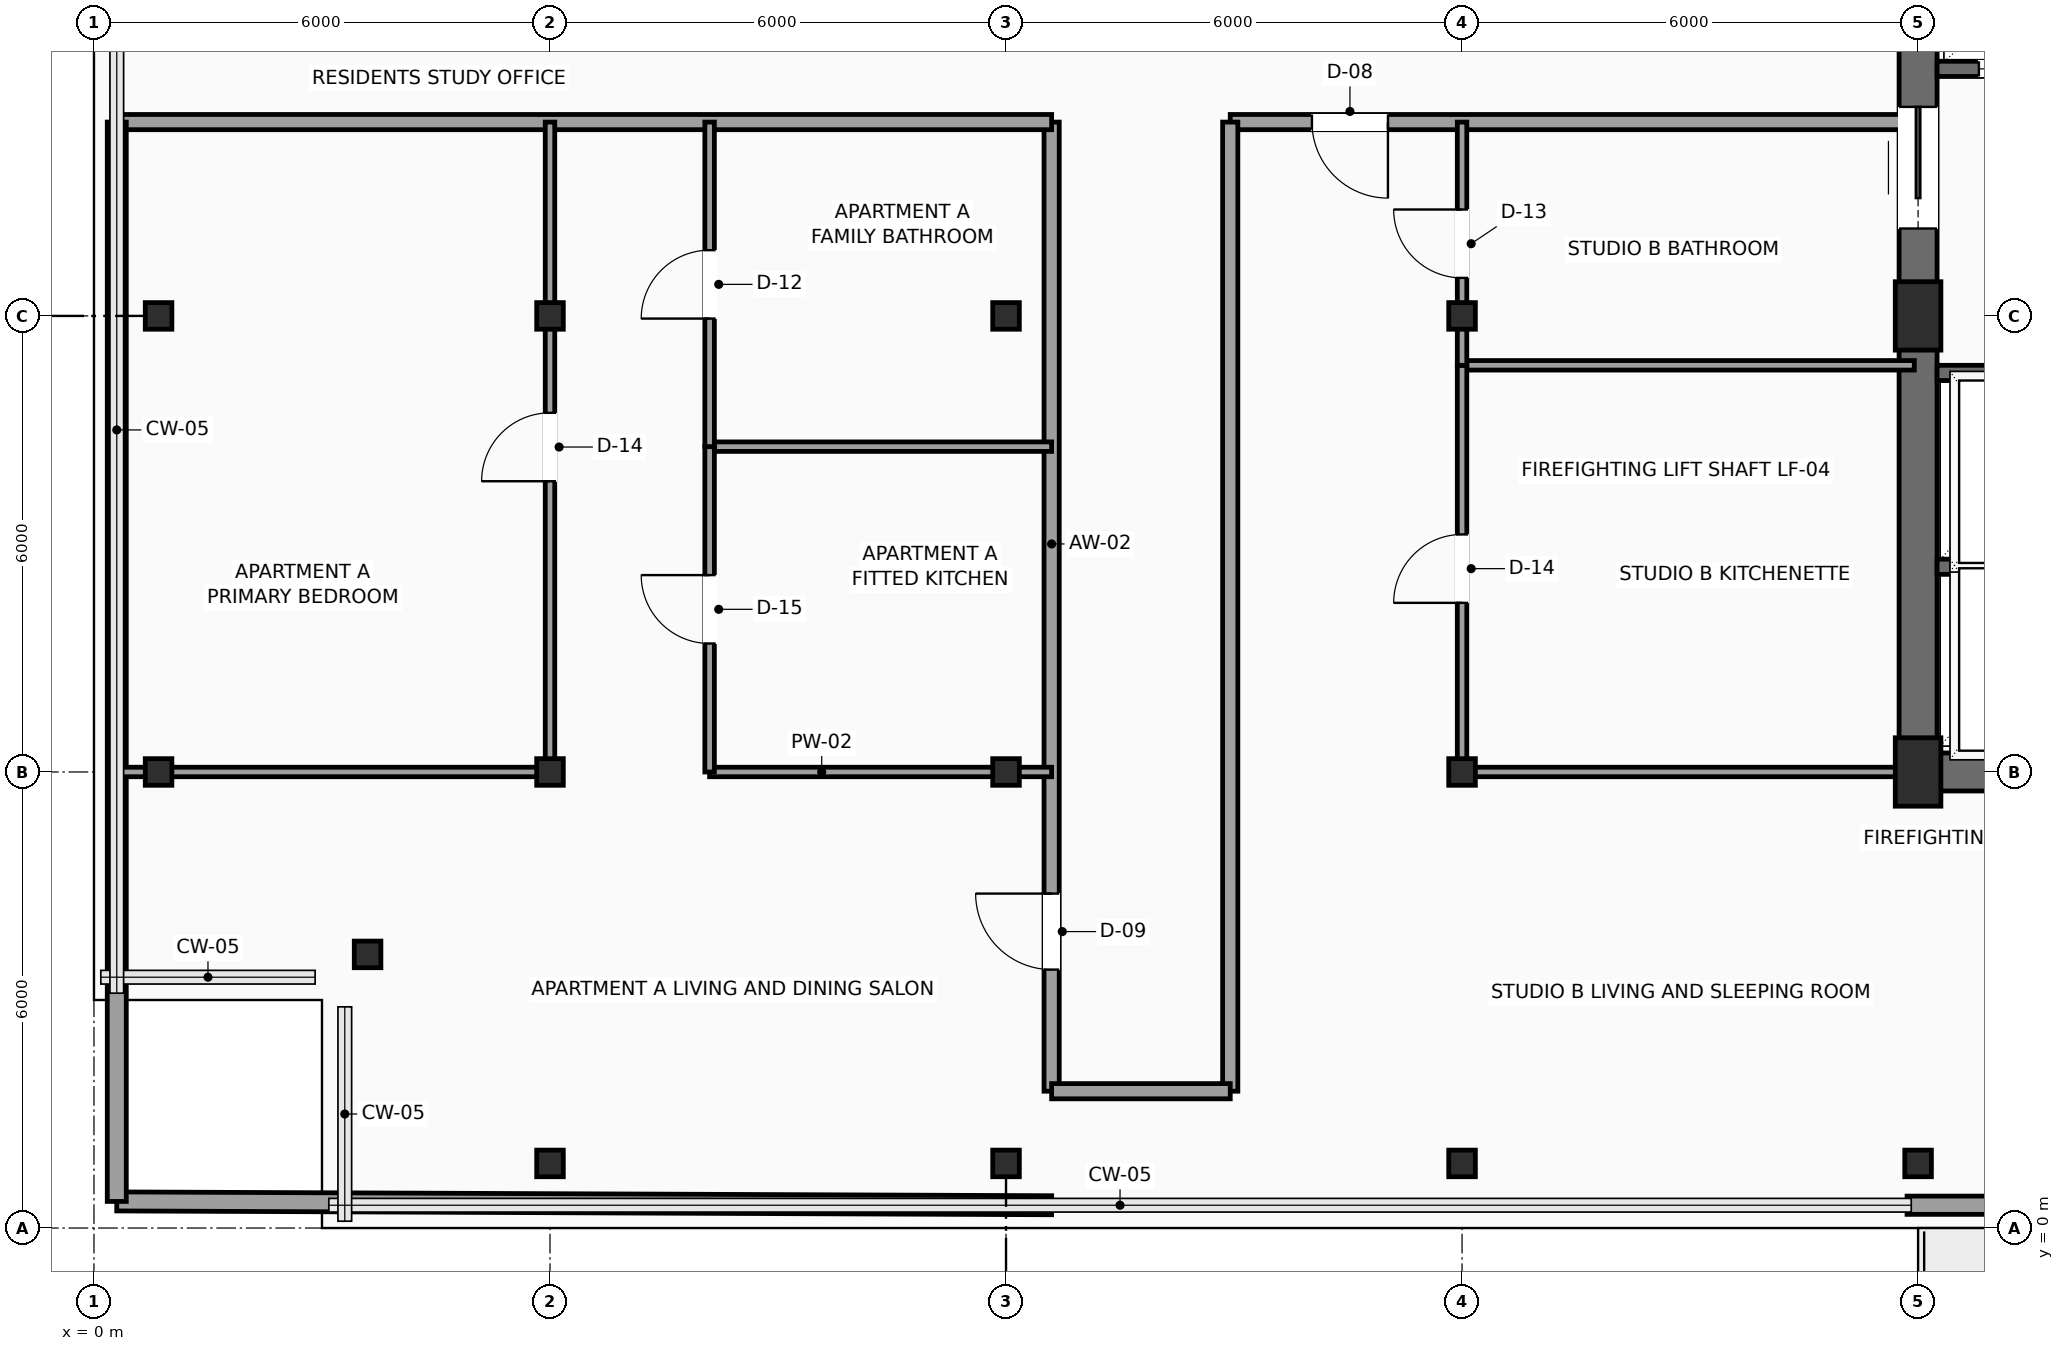
"""IFC4 building model, lengths in metres.
Left out: names, types, materials, properties, quantities, classifications, styles, units other than length and angle.
Written with IfcOpenShell. Run it as: python <this file> out.ifc"""

import sys

from ifc_helpers import new_model, si_unit, direction, frame, frame_2d, origin, origin_2d, place, context, subcontext, project, spatial, rectangle, hollow_rectangle, extrude, element, fill, save


model = new_model("IFC4")
c1 = context("Model", 3, precision=1e-05, world=origin(), true_north=direction((0.0, 1.0)))
c2 = subcontext(c1, "Body", "Model", "MODEL_VIEW")
j1 = project(units=[si_unit("LENGTHUNIT", "METRE"), si_unit("PLANEANGLEUNIT", "RADIAN")], contexts=[c1])
p1 = place(None, origin())
s1 = spatial("IfcSite", under=j1, at=p1, CompositionType="ELEMENT")
p2 = place(p1, origin())
s2 = spatial("IfcBuilding", under=s1, at=p2, CompositionType="ELEMENT")
p3 = place(p2, frame((0.0, 0.0, 246.7)))
s3 = spatial("IfcBuildingStorey", under=s2, at=p3, CompositionType="ELEMENT", Elevation=246.7)
for number, where, z_axis, x_axis in (
    (1, (24.0, 6.0, 0.0), (0.0, 0.0, 1.0), (1.0, 0.0, 0.0)),
    (2, (24.0, 12.0, 0.0), (0.0, 0.0, 1.0), (1.0, 0.0, 0.0)),
):
    element("IfcColumn", number, at=place(p3, frame(where, z_axis=z_axis, x_axis=x_axis)), inside=s3, PredefinedType="COLUMN", context=c2, shape_type="SweptSolid", body=[
        extrude(rectangle(XDim=0.6, YDim=0.9, at=origin_2d()), origin(), (0.0, 0.0, 1.0), 3.5),
    ])
for number, where, z_axis, x_axis in (
    (3, (3.6, 3.6, 0.0), (0.0, 0.0, 1.0), (1.0, 0.0, 0.0)),
    (4, (0.85, 6.0, 0.0), (0.0, 0.0, 1.0), (1.0, 0.0, 0.0)),
    (5, (0.85, 12.0, 0.0), (0.0, 0.0, 1.0), (1.0, 0.0, 0.0)),
    (6, (6.0, 0.85, 0.0), (0.0, 0.0, 1.0), (1.0, 0.0, 0.0)),
    (7, (6.0, 6.0, 0.0), (0.0, 0.0, 1.0), (1.0, 0.0, 0.0)),
    (8, (6.0, 12.0, 0.0), (0.0, 0.0, 1.0), (1.0, 0.0, 0.0)),
    (9, (12.0, 0.85, 0.0), (0.0, 0.0, 1.0), (1.0, 0.0, 0.0)),
    (10, (12.0, 6.0, 0.0), (0.0, 0.0, 1.0), (1.0, 0.0, 0.0)),
    (11, (12.0, 12.0, 0.0), (0.0, 0.0, 1.0), (1.0, 0.0, 0.0)),
    (12, (18.0, 0.85, 0.0), (0.0, 0.0, 1.0), (1.0, 0.0, 0.0)),
    (13, (18.0, 6.0, 0.0), (0.0, 0.0, 1.0), (1.0, 0.0, 0.0)),
    (14, (18.0, 12.0, 0.0), (0.0, 0.0, 1.0), (1.0, 0.0, 0.0)),
    (15, (24.0, 0.85, 0.0), (0.0, 0.0, 1.0), (1.0, 0.0, 0.0)),
):
    element("IfcColumn", number, at=place(p3, frame(where, z_axis=z_axis, x_axis=x_axis)), inside=s3, PredefinedType="COLUMN", context=c2, shape_type="SweptSolid", body=[
        extrude(hollow_rectangle(XDim=0.35, YDim=0.35, WallThickness=0.016, InnerFilletRadius=0.016, OuterFilletRadius=0.032, at=origin_2d()), origin(), (0.0, 0.0, 1.0), 3.5),
    ])
p4 = place(p3, frame((33.145, 0.3, 0.0), z_axis=(0.0, 0.0, 1.0), x_axis=(-1.0, 0.0, 0.0)))
e16 = element("IfcWall", 16, at=p4, inside=s3, PredefinedType="SOLIDWALL", context=c2, shape_type="SweptSolid", body=[
    extrude(rectangle(XDim=9.29, YDim=0.24, at=frame_2d((4.645, 0.0))), origin(), (0.0, 0.0, 1.0), 3.3),
])
p5 = place(p4, frame((3.945, 0.0, 0.0)))
e17 = element("IfcOpeningElement", 17, at=p5, cuts=e16, PredefinedType="OPENING", context=c2, shape_type="SweptSolid", body=[
    extrude(rectangle(XDim=1.05, YDim=2.2, at=frame_2d((0.525, 1.1))), frame((0.0, 0.13, 0.0), z_axis=(0.0, -1.0, 0.0), x_axis=(1.0, 0.0, 0.0)), (0.0, 0.0, 1.0), 0.26),
])
p6 = place(p4, frame((5.345, 0.0, 0.6)))
e18 = element("IfcOpeningElement", 18, at=p6, cuts=e16, PredefinedType="OPENING", context=c2, shape_type="SweptSolid", body=[
    extrude(rectangle(XDim=2.7, YDim=2.3, at=frame_2d((1.35, 1.15))), frame((0.0, 0.13, 0.0), z_axis=(0.0, -1.0, 0.0), x_axis=(1.0, 0.0, 0.0)), (0.0, 0.0, 1.0), 0.26),
])
p7 = place(p4, frame((1.4, 0.0, 0.6)))
e19 = element("IfcOpeningElement", 19, at=p7, cuts=e16, PredefinedType="OPENING", context=c2, shape_type="SweptSolid", body=[
    extrude(rectangle(XDim=0.9, YDim=2.2, at=frame_2d((0.45, 1.1))), frame((0.0, 0.13, 0.0), z_axis=(0.0, -1.0, 0.0), x_axis=(1.0, 0.0, 0.0)), (0.0, 0.0, 1.0), 0.26),
])
p8 = place(p3, frame((24.0, 6.0, 0.0), z_axis=(0.0, 0.0, 1.0), x_axis=(1.0, 0.0, 0.0)))
e20 = element("IfcWall", 20, at=p8, inside=s3, PredefinedType="SHEAR", context=c2, shape_type="SweptSolid", body=[
    extrude(rectangle(XDim=9.6, YDim=0.5, at=frame_2d((4.8, 0.0))), origin(), (0.0, 0.0, 1.0), 3.3),
])
p9 = place(p3, frame((24.0, 6.0, 0.0), z_axis=(0.0, 0.0, 1.0), x_axis=(0.0, 1.0, 0.0)))
e21 = element("IfcWall", 21, at=p9, inside=s3, PredefinedType="SHEAR", context=c2, shape_type="SweptSolid", body=[
    extrude(rectangle(XDim=12.0, YDim=0.5, at=frame_2d((6.0, 0.0))), origin(), (0.0, 0.0, 1.0), 3.3),
])
p10 = place(p9, frame((7.15, 0.0, 0.0)))
e22 = element("IfcOpeningElement", 22, at=p10, cuts=e21, PredefinedType="OPENING", context=c2, shape_type="SweptSolid", body=[
    extrude(rectangle(XDim=1.6, YDim=2.3, at=frame_2d((0.8, 1.15))), frame((0.0, 0.26, 0.0), z_axis=(0.0, -1.0, 0.0), x_axis=(1.0, 0.0, 0.0)), (0.0, 0.0, 1.0), 0.52),
])
for number, where, z_axis, x_axis in (
    (23, (24.25, 8.7, 0.0), (0.0, 0.0, 1.0), (1.0, 0.0, 0.0)),
    (24, (24.25, 11.25, 0.0), (0.0, 0.0, 1.0), (1.0, 0.0, 0.0)),
):
    element("IfcWall", number, at=place(p3, frame(where, z_axis=z_axis, x_axis=x_axis)), inside=s3, PredefinedType="SHEAR", context=c2, shape_type="SweptSolid", body=[
        extrude(rectangle(XDim=2.17, YDim=0.2, at=frame_2d((1.085, 0.0))), origin(), (0.0, 0.0, 1.0), 3.3),
    ])
p11 = place(p3, frame((24.25, 15.25, 0.0), z_axis=(0.0, 0.0, 1.0), x_axis=(1.0, 0.0, 0.0)))
e25 = element("IfcWall", 25, at=p11, inside=s3, PredefinedType="SHEAR", context=c2, shape_type="SweptSolid", body=[
    extrude(rectangle(XDim=5.2, YDim=0.2, at=frame_2d((2.6, 0.0))), origin(), (0.0, 0.0, 1.0), 3.3),
])
p12 = place(p11, frame((0.55, 0.0, 0.0)))
e26 = element("IfcOpeningElement", 26, at=p12, cuts=e25, PredefinedType="OPENING", context=c2, shape_type="SweptSolid", body=[
    extrude(rectangle(XDim=1.2, YDim=2.2, at=frame_2d((0.6, 1.1))), frame((0.0, 0.11, 0.0), z_axis=(0.0, -1.0, 0.0), x_axis=(1.0, 0.0, 0.0)), (0.0, 0.0, 1.0), 0.22),
])
p13 = place(p11, frame((3.15, 0.0, 0.0)))
e27 = element("IfcOpeningElement", 27, at=p13, cuts=e25, PredefinedType="OPENING", context=c2, shape_type="SweptSolid", body=[
    extrude(rectangle(XDim=1.2, YDim=2.2, at=frame_2d((0.6, 1.1))), frame((0.0, 0.11, 0.0), z_axis=(0.0, -1.0, 0.0), x_axis=(1.0, 0.0, 0.0)), (0.0, 0.0, 1.0), 0.22),
])
p14 = place(p3, frame((12.6, 1.8, 0.0), z_axis=(0.0, 0.0, 1.0), x_axis=(0.0, 1.0, 0.0)))
e28 = element("IfcWall", 28, at=p14, inside=s3, PredefinedType="PARTITIONING", context=c2, shape_type="SweptSolid", body=[
    extrude(rectangle(XDim=12.75, YDim=0.2, at=frame_2d((6.375, 0.0))), origin(), (0.0, 0.0, 1.0), 3.3),
])
p15 = place(p14, frame((1.6, 0.0, 0.0)))
e29 = element("IfcOpeningElement", 29, at=p15, cuts=e28, PredefinedType="OPENING", context=c2, shape_type="SweptSolid", body=[
    extrude(rectangle(XDim=1.0, YDim=2.2, at=frame_2d((0.5, 1.1))), frame((0.0, 0.11, 0.0), z_axis=(0.0, -1.0, 0.0), x_axis=(1.0, 0.0, 0.0)), (0.0, 0.0, 1.0), 0.22),
])
p16 = place(p3, frame((12.6, 14.55, 0.0), z_axis=(0.0, 0.0, 1.0), x_axis=(-1.0, 0.0, 0.0)))
e30 = element("IfcWall", 30, at=p16, inside=s3, PredefinedType="PARTITIONING", context=c2, shape_type="SweptSolid", body=[
    extrude(rectangle(XDim=12.3, YDim=0.2, at=frame_2d((6.15, 0.0))), origin(), (0.0, 0.0, 1.0), 3.3),
])
p17 = place(p3, frame((23.95, 14.55, 0.0), z_axis=(0.0, 0.0, 1.0), x_axis=(-1.0, 0.0, 0.0)))
e31 = element("IfcWall", 31, at=p17, inside=s3, PredefinedType="PARTITIONING", context=c2, shape_type="SweptSolid", body=[
    extrude(rectangle(XDim=9.0, YDim=0.2, at=frame_2d((4.5, 0.0))), origin(), (0.0, 0.0, 1.0), 3.3),
])
p18 = place(p17, frame((6.925, 0.0, 0.0)))
e32 = element("IfcOpeningElement", 32, at=p18, cuts=e31, PredefinedType="OPENING", context=c2, shape_type="SweptSolid", body=[
    extrude(rectangle(XDim=1.0, YDim=2.2, at=frame_2d((0.5, 1.1))), frame((0.0, 0.11, 0.0), z_axis=(0.0, -1.0, 0.0), x_axis=(1.0, 0.0, 0.0)), (0.0, 0.0, 1.0), 0.22),
])
p19 = place(p3, frame((14.95, 14.55, 0.0), z_axis=(0.0, 0.0, 1.0), x_axis=(0.0, -1.0, 0.0)))
e33 = element("IfcWall", 33, at=p19, inside=s3, PredefinedType="PARTITIONING", context=c2, shape_type="SweptSolid", body=[
    extrude(rectangle(XDim=12.75, YDim=0.2, at=frame_2d((6.375, 0.0))), origin(), (0.0, 0.0, 1.0), 3.3),
])
p20 = place(p3, frame((14.95, 1.8, 0.0), z_axis=(0.0, 0.0, 1.0), x_axis=(-1.0, 0.0, 0.0)))
e34 = element("IfcWall", 34, at=p20, inside=s3, PredefinedType="PARTITIONING", context=c2, shape_type="SweptSolid", body=[
    extrude(rectangle(XDim=2.35, YDim=0.2, at=frame_2d((1.175, 0.0))), origin(), (0.0, 0.0, 1.0), 3.3),
])
p21 = place(p3, frame((0.3, 0.35, 0.0), z_axis=(0.0, 0.0, 1.0), x_axis=(0.999991721746, -0.00406896058, 0.0)))
e35 = element("IfcWall", 35, at=p21, inside=s3, PredefinedType="PARTITIONING", context=c2, shape_type="SweptSolid", body=[
    extrude(rectangle(XDim=12.3, YDim=0.25, at=frame_2d((6.15, 0.0))), origin(), (0.0, 0.0, 1.0), 3.3),
])
p22 = place(p3, frame((0.3, 0.35, 0.0), z_axis=(0.0, 0.0, 1.0), x_axis=(0.0, 1.0, 0.0)))
e36 = element("IfcWall", 36, at=p22, inside=s3, PredefinedType="PARTITIONING", context=c2, shape_type="SweptSolid", body=[
    extrude(rectangle(XDim=14.2, YDim=0.25, at=frame_2d((7.1, 0.0))), origin(), (0.0, 0.0, 1.0), 3.3),
])
p23 = place(p3, frame((8.1, 6.0, 0.0), z_axis=(0.0, 0.0, 1.0), x_axis=(1.0, 0.0, 0.0)))
e37 = element("IfcWall", 37, at=p23, inside=s3, PredefinedType="PARTITIONING", context=c2, shape_type="SweptSolid", body=[
    extrude(rectangle(XDim=4.5, YDim=0.125, at=frame_2d((2.25, 0.0))), origin(), (0.0, 0.0, 1.0), 2.992),
])
p24 = place(p3, frame((8.1, 10.28, 0.0), z_axis=(0.0, 0.0, 1.0), x_axis=(1.0, 0.0, 0.0)))
e38 = element("IfcWall", 38, at=p24, inside=s3, PredefinedType="PARTITIONING", context=c2, shape_type="SweptSolid", body=[
    extrude(rectangle(XDim=4.5, YDim=0.125, at=frame_2d((2.25, 0.0))), origin(), (0.0, 0.0, 1.0), 3.3),
])
p25 = place(p3, frame((8.1, 6.0, 0.0), z_axis=(0.0, 0.0, 1.0), x_axis=(0.0, 1.0, 0.0)))
e39 = element("IfcWall", 39, at=p25, inside=s3, PredefinedType="PARTITIONING", context=c2, shape_type="SweptSolid", body=[
    extrude(rectangle(XDim=4.28, YDim=0.125, at=frame_2d((2.14, 0.0))), origin(), (0.0, 0.0, 1.0), 3.3),
])
p26 = place(p25, frame((1.69, 0.0, 0.0)))
e40 = element("IfcOpeningElement", 40, at=p26, cuts=e39, PredefinedType="OPENING", context=c2, shape_type="SweptSolid", body=[
    extrude(rectangle(XDim=0.9, YDim=2.1, at=frame_2d((0.45, 1.05))), frame((0.0, 0.073, 0.0), z_axis=(0.0, -1.0, 0.0), x_axis=(1.0, 0.0, 0.0)), (0.0, 0.0, 1.0), 0.145),
])
p27 = place(p3, frame((8.1, 10.28, 0.0), z_axis=(0.0, 0.0, 1.0), x_axis=(0.0, 1.0, 0.0)))
e41 = element("IfcWall", 41, at=p27, inside=s3, PredefinedType="PARTITIONING", context=c2, shape_type="SweptSolid", body=[
    extrude(rectangle(XDim=4.27, YDim=0.125, at=frame_2d((2.135, 0.0))), origin(), (0.0, 0.0, 1.0), 3.3),
])
p28 = place(p27, frame((1.685, 0.0, 0.0)))
e42 = element("IfcOpeningElement", 42, at=p28, cuts=e41, PredefinedType="OPENING", context=c2, shape_type="SweptSolid", body=[
    extrude(rectangle(XDim=0.9, YDim=2.1, at=frame_2d((0.45, 1.05))), frame((0.0, 0.073, 0.0), z_axis=(0.0, -1.0, 0.0), x_axis=(1.0, 0.0, 0.0)), (0.0, 0.0, 1.0), 0.145),
])
p29 = place(p3, frame((0.3, 6.0, 0.0), z_axis=(0.0, 0.0, 1.0), x_axis=(1.0, 0.0, 0.0)))
e43 = element("IfcWall", 43, at=p29, inside=s3, PredefinedType="PARTITIONING", context=c2, shape_type="SweptSolid", body=[
    extrude(rectangle(XDim=5.7, YDim=0.125, at=frame_2d((2.85, 0.0))), origin(), (0.0, 0.0, 1.0), 2.992),
])
p30 = place(p3, frame((6.0, 6.0, 0.0), z_axis=(0.0, 0.0, 1.0), x_axis=(0.0, 1.0, 0.0)))
e44 = element("IfcWall", 44, at=p30, inside=s3, PredefinedType="PARTITIONING", context=c2, shape_type="SweptSolid", body=[
    extrude(rectangle(XDim=8.55, YDim=0.125, at=frame_2d((4.275, 0.0))), origin(), (0.0, 0.0, 1.0), 2.992),
])
p31 = place(p30, frame((3.825, 0.0, 0.0)))
e45 = element("IfcOpeningElement", 45, at=p31, cuts=e44, PredefinedType="OPENING", context=c2, shape_type="SweptSolid", body=[
    extrude(rectangle(XDim=0.9, YDim=2.1, at=frame_2d((0.45, 1.05))), frame((0.0, 0.073, 0.0), z_axis=(0.0, -1.0, 0.0), x_axis=(1.0, 0.0, 0.0)), (0.0, 0.0, 1.0), 0.145),
])
p32 = place(p3, frame((18.0, 6.0, 0.0), z_axis=(0.0, 0.0, 1.0), x_axis=(1.0, 0.0, 0.0)))
e46 = element("IfcWall", 46, at=p32, inside=s3, PredefinedType="PARTITIONING", context=c2, shape_type="SweptSolid", body=[
    extrude(rectangle(XDim=5.95, YDim=0.125, at=frame_2d((2.975, 0.0))), origin(), (0.0, 0.0, 1.0), 2.992),
])
p33 = place(p3, frame((18.0, 11.35, 0.0), z_axis=(0.0, 0.0, 1.0), x_axis=(1.0, 0.0, 0.0)))
e47 = element("IfcWall", 47, at=p33, inside=s3, PredefinedType="PARTITIONING", context=c2, shape_type="SweptSolid", body=[
    extrude(rectangle(XDim=5.95, YDim=0.125, at=frame_2d((2.975, 0.0))), origin(), (0.0, 0.0, 1.0), 3.3),
])
p34 = place(p3, frame((18.0, 6.0, 0.0), z_axis=(0.0, 0.0, 1.0), x_axis=(0.0, 1.0, 0.0)))
e48 = element("IfcWall", 48, at=p34, inside=s3, PredefinedType="PARTITIONING", context=c2, shape_type="SweptSolid", body=[
    extrude(rectangle(XDim=5.35, YDim=0.125, at=frame_2d((2.675, 0.0))), origin(), (0.0, 0.0, 1.0), 2.992),
])
p35 = place(p34, frame((2.225, 0.0, 0.0)))
e49 = element("IfcOpeningElement", 49, at=p35, cuts=e48, PredefinedType="OPENING", context=c2, shape_type="SweptSolid", body=[
    extrude(rectangle(XDim=0.9, YDim=2.1, at=frame_2d((0.45, 1.05))), frame((0.0, 0.073, 0.0), z_axis=(0.0, -1.0, 0.0), x_axis=(1.0, 0.0, 0.0)), (0.0, 0.0, 1.0), 0.145),
])
p36 = place(p3, frame((18.0, 11.35, 0.0), z_axis=(0.0, 0.0, 1.0), x_axis=(0.0, 1.0, 0.0)))
e50 = element("IfcWall", 50, at=p36, inside=s3, PredefinedType="PARTITIONING", context=c2, shape_type="SweptSolid", body=[
    extrude(rectangle(XDim=3.2, YDim=0.125, at=frame_2d((1.6, 0.0))), origin(), (0.0, 0.0, 1.0), 2.992),
])
p37 = place(p36, frame((1.15, 0.0, 0.0)))
e51 = element("IfcOpeningElement", 51, at=p37, cuts=e50, PredefinedType="OPENING", context=c2, shape_type="SweptSolid", body=[
    extrude(rectangle(XDim=0.9, YDim=2.1, at=frame_2d((0.45, 1.05))), frame((0.0, 0.073, 0.0), z_axis=(0.0, -1.0, 0.0), x_axis=(1.0, 0.0, 0.0)), (0.0, 0.0, 1.0), 0.145),
])
p38 = place(p10, origin())
e52 = element("IfcDoor", 52, at=p38, inside=s3, OperationType="DOUBLE_DOOR_SLIDING", PredefinedType="DOOR", context=c2, shape_type="SweptSolid", body=[
    extrude(rectangle(XDim=1.6, YDim=2.3, at=frame_2d((0.8, 1.15))), frame((0.0, 0.025, 0.0), z_axis=(0.0, -1.0, 0.0), x_axis=(1.0, 0.0, 0.0)), (0.0, 0.0, 1.0), 0.05),
])
fill(e22, e52)
p39 = place(p12, origin())
e53 = element("IfcDoor", 53, at=p39, inside=s3, OperationType="SLIDING_TO_RIGHT", PredefinedType="DOOR", context=c2, shape_type="SweptSolid", body=[
    extrude(rectangle(XDim=1.2, YDim=2.2, at=frame_2d((0.6, 1.1))), frame((0.0, 0.025, 0.0), z_axis=(0.0, -1.0, 0.0), x_axis=(1.0, 0.0, 0.0)), (0.0, 0.0, 1.0), 0.05),
])
fill(e26, e53)
p40 = place(p15, origin())
e54 = element("IfcDoor", 54, at=p40, inside=s3, OperationType="SINGLE_SWING_RIGHT", PredefinedType="DOOR", context=c2, shape_type="SweptSolid", body=[
    extrude(rectangle(XDim=1.0, YDim=2.2, at=frame_2d((0.5, 1.1))), frame((0.0, 0.025, 0.0), z_axis=(0.0, -1.0, 0.0), x_axis=(1.0, 0.0, 0.0)), (0.0, 0.0, 1.0), 0.05),
])
fill(e29, e54)
p41 = place(p18, origin())
e55 = element("IfcDoor", 55, at=p41, inside=s3, OperationType="SINGLE_SWING_LEFT", PredefinedType="DOOR", context=c2, shape_type="SweptSolid", body=[
    extrude(rectangle(XDim=1.0, YDim=2.2, at=frame_2d((0.5, 1.1))), frame((0.0, 0.025, 0.0), z_axis=(0.0, -1.0, 0.0), x_axis=(1.0, 0.0, 0.0)), (0.0, 0.0, 1.0), 0.05),
])
fill(e32, e55)
p42 = place(p26, origin())
e56 = element("IfcDoor", 56, at=p42, inside=s3, OperationType="SINGLE_SWING_RIGHT", PredefinedType="DOOR", context=c2, shape_type="SweptSolid", body=[
    extrude(rectangle(XDim=0.9, YDim=2.1, at=frame_2d((0.45, 1.05))), frame((0.0, 0.025, 0.0), z_axis=(0.0, -1.0, 0.0), x_axis=(1.0, 0.0, 0.0)), (0.0, 0.0, 1.0), 0.05),
])
fill(e40, e56)
p43 = place(p28, origin())
e57 = element("IfcDoor", 57, at=p43, inside=s3, OperationType="SINGLE_SWING_LEFT", PredefinedType="DOOR", context=c2, shape_type="SweptSolid", body=[
    extrude(rectangle(XDim=0.9, YDim=2.1, at=frame_2d((0.45, 1.05))), frame((0.0, 0.025, 0.0), z_axis=(0.0, -1.0, 0.0), x_axis=(1.0, 0.0, 0.0)), (0.0, 0.0, 1.0), 0.05),
])
fill(e42, e57)
p44 = place(p31, origin())
e58 = element("IfcDoor", 58, at=p44, inside=s3, OperationType="SINGLE_SWING_LEFT", PredefinedType="DOOR", context=c2, shape_type="SweptSolid", body=[
    extrude(rectangle(XDim=0.9, YDim=2.1, at=frame_2d((0.45, 1.05))), frame((0.0, 0.025, 0.0), z_axis=(0.0, -1.0, 0.0), x_axis=(1.0, 0.0, 0.0)), (0.0, 0.0, 1.0), 0.05),
])
fill(e45, e58)
p45 = place(p35, origin())
e59 = element("IfcDoor", 59, at=p45, inside=s3, OperationType="SINGLE_SWING_LEFT", PredefinedType="DOOR", context=c2, shape_type="SweptSolid", body=[
    extrude(rectangle(XDim=0.9, YDim=2.1, at=frame_2d((0.45, 1.05))), frame((0.0, 0.025, 0.0), z_axis=(0.0, -1.0, 0.0), x_axis=(1.0, 0.0, 0.0)), (0.0, 0.0, 1.0), 0.05),
])
fill(e49, e59)
p46 = place(p37, origin())
e60 = element("IfcDoor", 60, at=p46, inside=s3, OperationType="SINGLE_SWING_RIGHT", PredefinedType="DOOR", context=c2, shape_type="SweptSolid", body=[
    extrude(rectangle(XDim=0.9, YDim=2.1, at=frame_2d((0.45, 1.05))), frame((0.0, 0.025, 0.0), z_axis=(0.0, -1.0, 0.0), x_axis=(1.0, 0.0, 0.0)), (0.0, 0.0, 1.0), 0.05),
])
fill(e51, e60)
save(model, sys.argv[1])
